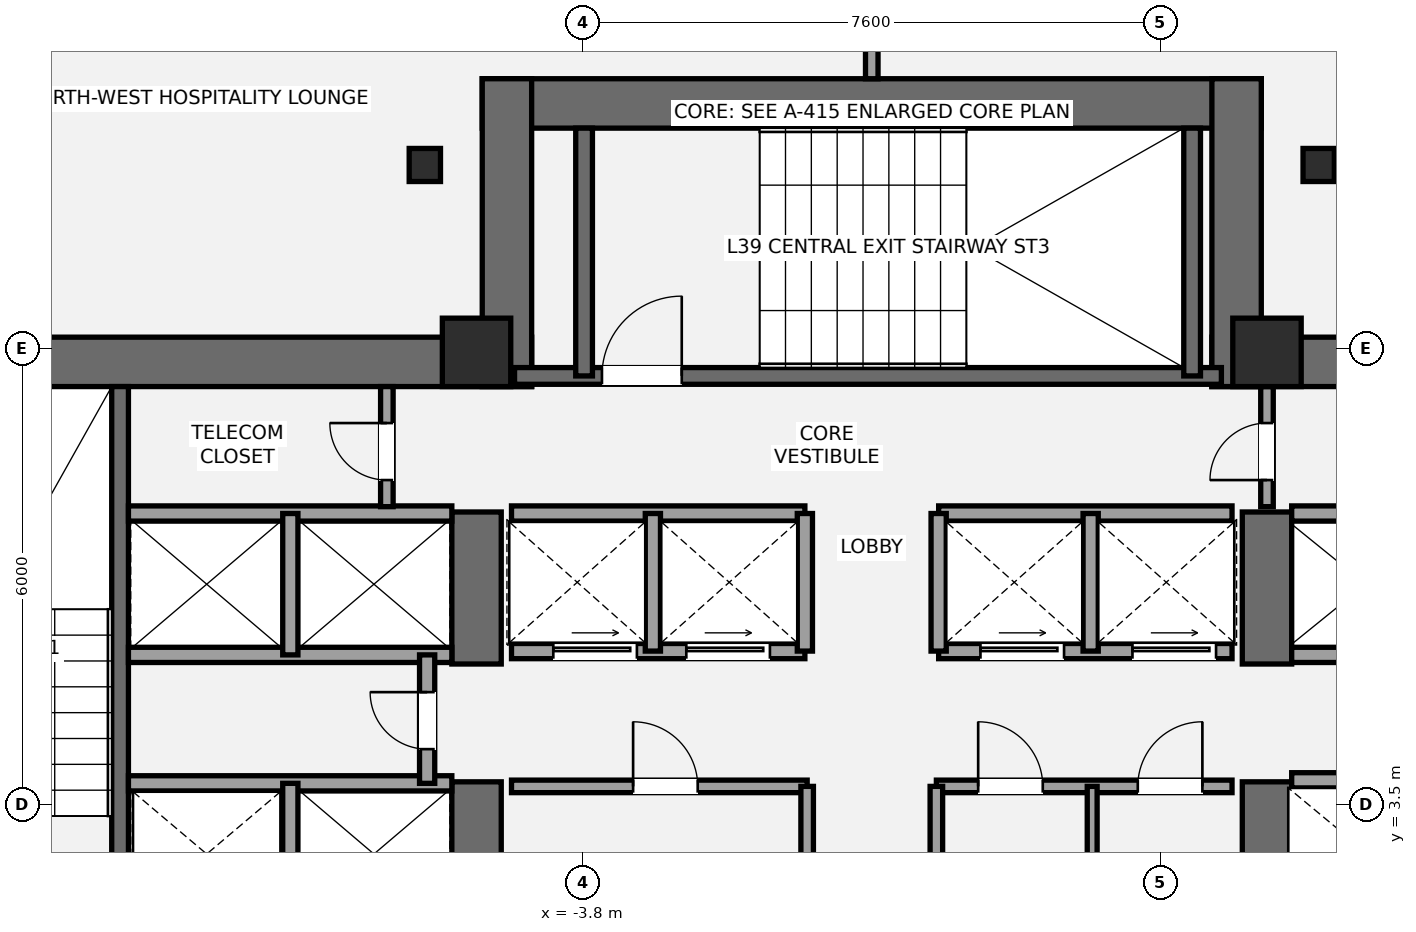
"""IFC4 building model, lengths in metres.
Left out: names, types, materials, properties, quantities, classifications, styles, units other than length and angle.
Written with IfcOpenShell. Run it as: python <this file> out.ifc"""

import sys

from ifc_helpers import new_model, si_unit, direction, frame, frame_2d, origin, origin_2d, place, context, subcontext, project, spatial, rectangle, i_section, extrude, element, fill, save


model = new_model("IFC4")
c1 = context("Model", 3, precision=1e-05, world=origin(), true_north=direction((0.0, 1.0)))
c2 = subcontext(c1, "Body", "Model", "MODEL_VIEW")
j1 = project(units=[si_unit("LENGTHUNIT", "METRE"), si_unit("PLANEANGLEUNIT", "RADIAN")], contexts=[c1])
p1 = place(None, origin())
s1 = spatial("IfcSite", under=j1, at=p1, CompositionType="ELEMENT")
p2 = place(p1, origin())
s2 = spatial("IfcBuilding", under=s1, at=p2, CompositionType="ELEMENT")
p3 = place(p2, frame((0.0, 0.0, 147.0)))
s3 = spatial("IfcBuildingStorey", under=s2, at=p3, CompositionType="ELEMENT", Elevation=147.0)
p4 = place(p3, frame((-13.8, 9.325, 0.0), z_axis=(0.0, 0.0, 1.0), x_axis=(1.0, 0.0, 0.0)))
e1 = element("IfcWall", 1, at=p4, inside=s3, PredefinedType="SHEAR", context=c2, shape_type="SweptSolid", body=[
    extrude(rectangle(XDim=9.325, YDim=0.65, at=frame_2d((4.663, 0.0))), origin(), (0.0, 0.0, 1.0), 3.2),
])
p5 = place(p3, frame((-5.2, 1.2, 0.0), z_axis=(0.0, 0.0, 1.0), x_axis=(0.0, 1.0, 0.0)))
e2 = element("IfcWall", 2, at=p5, inside=s3, PredefinedType="SHEAR", context=c2, shape_type="SweptSolid", body=[
    extrude(rectangle(XDim=2.6, YDim=0.65, at=frame_2d((1.3, 0.0))), origin(), (0.0, 0.0, 1.0), 3.2),
])
p6 = place(p3, frame((-5.2, 5.35, 0.0), z_axis=(0.0, 0.0, 1.0), x_axis=(0.0, 1.0, 0.0)))
e3 = element("IfcWall", 3, at=p6, inside=s3, PredefinedType="SHEAR", context=c2, shape_type="SweptSolid", body=[
    extrude(rectangle(XDim=2.0, YDim=0.65, at=frame_2d((1.0, 0.0))), origin(), (0.0, 0.0, 1.0), 3.2),
])
p7 = place(p3, frame((-9.89, 1.85, 0.0), z_axis=(0.0, 0.0, 1.0), x_axis=(0.0, 1.0, 0.0)))
e4 = element("IfcWall", 4, at=p7, inside=s3, PredefinedType="SHEAR", context=c2, shape_type="SweptSolid", body=[
    extrude(rectangle(XDim=7.15, YDim=0.22, at=frame_2d((3.575, 0.0))), origin(), (0.0, 0.0, 1.0), 3.2),
])
p8 = place(p3, frame((4.475, 9.325, 0.0), z_axis=(0.0, 0.0, 1.0), x_axis=(1.0, 0.0, 0.0)))
e5 = element("IfcWall", 5, at=p8, inside=s3, PredefinedType="SHEAR", context=c2, shape_type="SweptSolid", body=[
    extrude(rectangle(XDim=9.325, YDim=0.65, at=frame_2d((4.663, 0.0))), origin(), (0.0, 0.0, 1.0), 3.2),
])
p9 = place(p3, frame((5.2, 1.2, 0.0), z_axis=(0.0, 0.0, 1.0), x_axis=(0.0, 1.0, 0.0)))
e6 = element("IfcWall", 6, at=p9, inside=s3, PredefinedType="SHEAR", context=c2, shape_type="SweptSolid", body=[
    extrude(rectangle(XDim=2.6, YDim=0.65, at=frame_2d((1.3, 0.0))), origin(), (0.0, 0.0, 1.0), 3.2),
])
p10 = place(p3, frame((5.2, 5.35, 0.0), z_axis=(0.0, 0.0, 1.0), x_axis=(0.0, 1.0, 0.0)))
e7 = element("IfcWall", 7, at=p10, inside=s3, PredefinedType="SHEAR", context=c2, shape_type="SweptSolid", body=[
    extrude(rectangle(XDim=2.0, YDim=0.65, at=frame_2d((1.0, 0.0))), origin(), (0.0, 0.0, 1.0), 3.2),
])
p11 = place(p3, frame((-5.125, 12.725, 0.0), z_axis=(0.0, 0.0, 1.0), x_axis=(1.0, 0.0, 0.0)))
e8 = element("IfcWall", 8, at=p11, inside=s3, PredefinedType="SHEAR", context=c2, shape_type="SweptSolid", body=[
    extrude(rectangle(XDim=10.25, YDim=0.65, at=frame_2d((5.125, 0.0))), origin(), (0.0, 0.0, 1.0), 3.2),
])
for number, where, z_axis, x_axis in (
    (9, (-4.8, 9.0, 0.0), (0.0, 0.0, 1.0), (0.0, 1.0, 0.0)),
    (10, (4.8, 9.0, 0.0), (0.0, 0.0, 1.0), (0.0, 1.0, 0.0)),
):
    element("IfcWall", number, at=place(p3, frame(where, z_axis=z_axis, x_axis=x_axis)), inside=s3, PredefinedType="SHEAR", context=c2, shape_type="SweptSolid", body=[
        extrude(rectangle(XDim=4.05, YDim=0.65, at=frame_2d((2.025, 0.0))), origin(), (0.0, 0.0, 1.0), 3.2),
    ])
p12 = place(p3, frame((-4.7, 9.14, 0.0), z_axis=(0.0, 0.0, 1.0), x_axis=(1.0, 0.0, 0.0)))
e11 = element("IfcWall", 11, at=p12, inside=s3, PredefinedType="SHEAR", context=c2, shape_type="SweptSolid", body=[
    extrude(rectangle(XDim=9.3, YDim=0.22, at=frame_2d((4.65, 0.0))), origin(), (0.0, 0.0, 1.0), 3.2),
])
p13 = place(p12, frame((1.15, 0.0, 0.0)))
e12 = element("IfcOpeningElement", 12, at=p13, cuts=e11, PredefinedType="OPENING", context=c2, shape_type="SweptSolid", body=[
    extrude(rectangle(XDim=1.05, YDim=2.15, at=frame_2d((0.525, 1.075))), frame((0.0, 0.12, 0.0), z_axis=(0.0, -1.0, 0.0), x_axis=(1.0, 0.0, 0.0)), (0.0, 0.0, 1.0), 0.24),
])
for number, where, z_axis, x_axis in (
    (13, (-3.785, 9.14, 0.0), (0.0, 0.0, 1.0), (0.0, 1.0, 0.0)),
    (14, (4.215, 9.14, 0.0), (0.0, 0.0, 1.0), (0.0, 1.0, 0.0)),
):
    element("IfcWall", number, at=place(p3, frame(where, z_axis=z_axis, x_axis=x_axis)), inside=s3, PredefinedType="SHEAR", context=c2, shape_type="SweptSolid", body=[
        extrude(rectangle(XDim=3.26, YDim=0.22, at=frame_2d((1.63, 0.0))), origin(), (0.0, 0.0, 1.0), 3.2),
    ])
for number, where, z_axis, x_axis in (
    (15, (-5.2, 9.45, 0.0), (0.0, 0.0, 1.0), (1.0, 0.0, 0.0)),
    (16, (5.2, 9.45, 0.0), (0.0, 0.0, 1.0), (1.0, 0.0, 0.0)),
):
    element("IfcColumn", number, at=place(p3, frame(where, z_axis=z_axis, x_axis=x_axis)), inside=s3, PredefinedType="COLUMN", context=c2, shape_type="SweptSolid", body=[
        extrude(rectangle(XDim=0.9, YDim=0.9, at=origin_2d()), origin(), (0.0, 0.0, 1.0), 3.2),
    ])
for number, where, z_axis, x_axis in (
    (17, (5.88, 11.915, 0.0), (0.0, 0.0, 1.0), (1.0, 0.0, 0.0)),
    (18, (-5.88, 11.915, 0.0), (0.0, 0.0, 1.0), (1.0, 0.0, 0.0)),
):
    element("IfcColumn", number, at=place(p3, frame(where, z_axis=z_axis, x_axis=x_axis)), inside=s3, PredefinedType="COLUMN", context=c2, shape_type="SweptSolid", body=[
        extrude(i_section(OverallWidth=0.412, OverallDepth=0.435, WebThickness=0.036, FlangeThickness=0.057, at=origin_2d()), origin(), (0.0, 0.0, 1.0), 3.2),
    ])
p14 = place(p3, frame((-9.78, 3.78, 0.0), z_axis=(0.0, 0.0, 1.0), x_axis=(1.0, 0.0, 0.0)))
e19 = element("IfcWall", 19, at=p14, inside=s3, PredefinedType="SOLIDWALL", context=c2, shape_type="SweptSolid", body=[
    extrude(rectangle(XDim=4.255, YDim=0.2, at=frame_2d((2.127, 0.0))), origin(), (0.0, 0.0, 1.0), 3.02),
])
p15 = place(p3, frame((-7.65, 1.85, 0.0), z_axis=(0.0, 0.0, 1.0), x_axis=(0.0, 1.0, 0.0)))
e20 = element("IfcWall", 20, at=p15, inside=s3, PredefinedType="SOLIDWALL", context=c2, shape_type="SweptSolid", body=[
    extrude(rectangle(XDim=1.93, YDim=0.2, at=frame_2d((0.965, 0.0))), origin(), (0.0, 0.0, 1.0), 3.02),
])
for number, where, z_axis, x_axis in (
    (21, (-9.78, 5.47, 0.0), (0.0, 0.0, 1.0), (1.0, 0.0, 0.0)),
    (22, (-9.78, 7.33, 0.0), (0.0, 0.0, 1.0), (1.0, 0.0, 0.0)),
):
    element("IfcWall", number, at=place(p3, frame(where, z_axis=z_axis, x_axis=x_axis)), inside=s3, PredefinedType="SOLIDWALL", context=c2, shape_type="SweptSolid", body=[
        extrude(rectangle(XDim=4.255, YDim=0.2, at=frame_2d((2.127, 0.0))), origin(), (0.0, 0.0, 1.0), 3.02),
    ])
p16 = place(p3, frame((-7.65, 5.47, 0.0), z_axis=(0.0, 0.0, 1.0), x_axis=(0.0, 1.0, 0.0)))
e23 = element("IfcWall", 23, at=p16, inside=s3, PredefinedType="SOLIDWALL", context=c2, shape_type="SweptSolid", body=[
    extrude(rectangle(XDim=1.86, YDim=0.2, at=frame_2d((0.93, 0.0))), origin(), (0.0, 0.0, 1.0), 3.02),
])
p17 = place(p3, frame((-5.85, 3.78, 0.0), z_axis=(0.0, 0.0, 1.0), x_axis=(0.0, 1.0, 0.0)))
e24 = element("IfcWall", 24, at=p17, inside=s3, PredefinedType="SOLIDWALL", context=c2, shape_type="SweptSolid", body=[
    extrude(rectangle(XDim=1.69, YDim=0.2, at=frame_2d((0.845, 0.0))), origin(), (0.0, 0.0, 1.0), 3.02),
])
p18 = place(p17, frame((0.45, 0.0, 0.0)))
e25 = element("IfcOpeningElement", 25, at=p18, cuts=e24, PredefinedType="OPENING", context=c2, shape_type="SweptSolid", body=[
    extrude(rectangle(XDim=0.75, YDim=2.1, at=frame_2d((0.375, 1.05))), frame((0.0, 0.11, 0.0), z_axis=(0.0, -1.0, 0.0), x_axis=(1.0, 0.0, 0.0)), (0.0, 0.0, 1.0), 0.22),
])
p19 = place(p3, frame((5.525, 3.82, 0.0), z_axis=(0.0, 0.0, 1.0), x_axis=(1.0, 0.0, 0.0)))
e26 = element("IfcWall", 26, at=p19, inside=s3, PredefinedType="SOLIDWALL", context=c2, shape_type="SweptSolid", body=[
    extrude(rectangle(XDim=4.255, YDim=0.2, at=frame_2d((2.127, 0.0))), origin(), (0.0, 0.0, 1.0), 3.02),
])
p20 = place(p19, frame((0.65, 0.0, 0.0)))
e27 = element("IfcOpeningElement", 27, at=p20, cuts=e26, PredefinedType="OPENING", context=c2, shape_type="SweptSolid", body=[
    extrude(rectangle(XDim=1.2, YDim=2.2, at=frame_2d((0.6, 1.1))), frame((0.0, 0.11, 0.0), z_axis=(0.0, -1.0, 0.0), x_axis=(1.0, 0.0, 0.0)), (0.0, 0.0, 1.0), 0.22),
])
for number, where, z_axis, x_axis in (
    (28, (5.525, 5.47, 0.0), (0.0, 0.0, 1.0), (1.0, 0.0, 0.0)),
    (29, (5.525, 7.33, 0.0), (0.0, 0.0, 1.0), (1.0, 0.0, 0.0)),
):
    element("IfcWall", number, at=place(p3, frame(where, z_axis=z_axis, x_axis=x_axis)), inside=s3, PredefinedType="SOLIDWALL", context=c2, shape_type="SweptSolid", body=[
        extrude(rectangle(XDim=4.255, YDim=0.2, at=frame_2d((2.127, 0.0))), origin(), (0.0, 0.0, 1.0), 3.02),
    ])
p21 = place(p3, frame((-4.74, 3.74, 0.0), z_axis=(0.0, 0.0, 1.0), x_axis=(1.0, 0.0, 0.0)))
e30 = element("IfcWall", 30, at=p21, inside=s3, PredefinedType="PARTITIONING", context=c2, shape_type="SweptSolid", body=[
    extrude(rectangle(XDim=3.89, YDim=0.165, at=frame_2d((1.945, 0.0))), origin(), (0.0, 0.0, 1.0), 3.02),
])
p22 = place(p21, frame((1.6, 0.0, 0.0)))
e31 = element("IfcOpeningElement", 31, at=p22, cuts=e30, PredefinedType="OPENING", context=c2, shape_type="SweptSolid", body=[
    extrude(rectangle(XDim=0.85, YDim=2.1, at=frame_2d((0.425, 1.05))), frame((0.0, 0.093, 0.0), z_axis=(0.0, -1.0, 0.0), x_axis=(1.0, 0.0, 0.0)), (0.0, 0.0, 1.0), 0.185),
])
p23 = place(p3, frame((-0.85, 1.92, 0.0), z_axis=(0.0, 0.0, 1.0), x_axis=(0.0, 1.0, 0.0)))
e32 = element("IfcWall", 32, at=p23, inside=s3, PredefinedType="PARTITIONING", context=c2, shape_type="SweptSolid", body=[
    extrude(rectangle(XDim=1.82, YDim=0.165, at=frame_2d((0.91, 0.0))), origin(), (0.0, 0.0, 1.0), 3.02),
])
p24 = place(p3, frame((0.85, 3.74, 0.0), z_axis=(0.0, 0.0, 1.0), x_axis=(1.0, 0.0, 0.0)))
e33 = element("IfcWall", 33, at=p24, inside=s3, PredefinedType="PARTITIONING", context=c2, shape_type="SweptSolid", body=[
    extrude(rectangle(XDim=3.89, YDim=0.165, at=frame_2d((1.945, 0.0))), origin(), (0.0, 0.0, 1.0), 3.02),
])
p25 = place(p24, frame((0.55, 0.0, 0.0)))
e34 = element("IfcOpeningElement", 34, at=p25, cuts=e33, PredefinedType="OPENING", context=c2, shape_type="SweptSolid", body=[
    extrude(rectangle(XDim=0.85, YDim=2.1, at=frame_2d((0.425, 1.05))), frame((0.0, 0.093, 0.0), z_axis=(0.0, -1.0, 0.0), x_axis=(1.0, 0.0, 0.0)), (0.0, 0.0, 1.0), 0.185),
])
p26 = place(p24, frame((2.65, 0.0, 0.0)))
e35 = element("IfcOpeningElement", 35, at=p26, cuts=e33, PredefinedType="OPENING", context=c2, shape_type="SweptSolid", body=[
    extrude(rectangle(XDim=0.85, YDim=2.1, at=frame_2d((0.425, 1.05))), frame((0.0, 0.093, 0.0), z_axis=(0.0, -1.0, 0.0), x_axis=(1.0, 0.0, 0.0)), (0.0, 0.0, 1.0), 0.185),
])
p27 = place(p3, frame((0.85, 1.92, 0.0), z_axis=(0.0, 0.0, 1.0), x_axis=(0.0, 1.0, 0.0)))
e36 = element("IfcWall", 36, at=p27, inside=s3, PredefinedType="PARTITIONING", context=c2, shape_type="SweptSolid", body=[
    extrude(rectangle(XDim=1.82, YDim=0.165, at=frame_2d((0.91, 0.0))), origin(), (0.0, 0.0, 1.0), 3.02),
])
p28 = place(p3, frame((2.9, 1.92, 0.0), z_axis=(0.0, 0.0, 1.0), x_axis=(0.0, 1.0, 0.0)))
e37 = element("IfcWall", 37, at=p28, inside=s3, PredefinedType="PARTITIONING", context=c2, shape_type="SweptSolid", body=[
    extrude(rectangle(XDim=1.82, YDim=0.13, at=frame_2d((0.91, 0.0))), origin(), (0.0, 0.0, 1.0), 3.02),
])
p29 = place(p3, frame((-4.74, 5.52, 0.0), z_axis=(0.0, 0.0, 1.0), x_axis=(1.0, 0.0, 0.0)))
e38 = element("IfcWall", 38, at=p29, inside=s3, PredefinedType="SOLIDWALL", context=c2, shape_type="SweptSolid", body=[
    extrude(rectangle(XDim=3.86, YDim=0.2, at=frame_2d((1.93, 0.0))), origin(), (0.0, 0.0, 1.0), 3.02),
])
p30 = place(p29, frame((0.55, 0.0, 0.0)))
e39 = element("IfcOpeningElement", 39, at=p30, cuts=e38, PredefinedType="OPENING", context=c2, shape_type="SweptSolid", body=[
    extrude(rectangle(XDim=1.1, YDim=2.2, at=frame_2d((0.55, 1.1))), frame((0.0, 0.11, 0.0), z_axis=(0.0, -1.0, 0.0), x_axis=(1.0, 0.0, 0.0)), (0.0, 0.0, 1.0), 0.22),
])
p31 = place(p29, frame((2.3, 0.0, 0.0)))
e40 = element("IfcOpeningElement", 40, at=p31, cuts=e38, PredefinedType="OPENING", context=c2, shape_type="SweptSolid", body=[
    extrude(rectangle(XDim=1.1, YDim=2.2, at=frame_2d((0.55, 1.1))), frame((0.0, 0.11, 0.0), z_axis=(0.0, -1.0, 0.0), x_axis=(1.0, 0.0, 0.0)), (0.0, 0.0, 1.0), 0.22),
])
p32 = place(p3, frame((0.88, 5.52, 0.0), z_axis=(0.0, 0.0, 1.0), x_axis=(1.0, 0.0, 0.0)))
e41 = element("IfcWall", 41, at=p32, inside=s3, PredefinedType="SOLIDWALL", context=c2, shape_type="SweptSolid", body=[
    extrude(rectangle(XDim=3.86, YDim=0.2, at=frame_2d((1.93, 0.0))), origin(), (0.0, 0.0, 1.0), 3.02),
])
p33 = place(p32, frame((0.55, 0.0, 0.0)))
e42 = element("IfcOpeningElement", 42, at=p33, cuts=e41, PredefinedType="OPENING", context=c2, shape_type="SweptSolid", body=[
    extrude(rectangle(XDim=1.1, YDim=2.2, at=frame_2d((0.55, 1.1))), frame((0.0, 0.11, 0.0), z_axis=(0.0, -1.0, 0.0), x_axis=(1.0, 0.0, 0.0)), (0.0, 0.0, 1.0), 0.22),
])
p34 = place(p32, frame((2.55, 0.0, 0.0)))
e43 = element("IfcOpeningElement", 43, at=p34, cuts=e41, PredefinedType="OPENING", context=c2, shape_type="SweptSolid", body=[
    extrude(rectangle(XDim=1.1, YDim=2.2, at=frame_2d((0.55, 1.1))), frame((0.0, 0.11, 0.0), z_axis=(0.0, -1.0, 0.0), x_axis=(1.0, 0.0, 0.0)), (0.0, 0.0, 1.0), 0.22),
])
for number, where, z_axis, x_axis in (
    (44, (-4.74, 7.33, 0.0), (0.0, 0.0, 1.0), (1.0, 0.0, 0.0)),
    (45, (0.88, 7.33, 0.0), (0.0, 0.0, 1.0), (1.0, 0.0, 0.0)),
):
    element("IfcWall", number, at=place(p3, frame(where, z_axis=z_axis, x_axis=x_axis)), inside=s3, PredefinedType="SOLIDWALL", context=c2, shape_type="SweptSolid", body=[
        extrude(rectangle(XDim=3.86, YDim=0.2, at=frame_2d((1.93, 0.0))), origin(), (0.0, 0.0, 1.0), 3.02),
    ])
for number, where, z_axis, x_axis in (
    (46, (-2.88, 5.52, 0.0), (0.0, 0.0, 1.0), (0.0, 1.0, 0.0)),
    (47, (2.88, 5.52, 0.0), (0.0, 0.0, 1.0), (0.0, 1.0, 0.0)),
    (48, (-0.88, 5.52, 0.0), (0.0, 0.0, 1.0), (0.0, 1.0, 0.0)),
    (49, (0.88, 5.52, 0.0), (0.0, 0.0, 1.0), (0.0, 1.0, 0.0)),
):
    element("IfcWall", number, at=place(p3, frame(where, z_axis=z_axis, x_axis=x_axis)), inside=s3, PredefinedType="SOLIDWALL", context=c2, shape_type="SweptSolid", body=[
        extrude(rectangle(XDim=1.81, YDim=0.2, at=frame_2d((0.905, 0.0))), origin(), (0.0, 0.0, 1.0), 3.02),
    ])
p35 = place(p3, frame((-6.38, 7.42, 0.0), z_axis=(0.0, 0.0, 1.0), x_axis=(0.0, 1.0, 0.0)))
e50 = element("IfcWall", 50, at=p35, inside=s3, PredefinedType="PARTITIONING", context=c2, shape_type="SweptSolid", body=[
    extrude(rectangle(XDim=1.58, YDim=0.165, at=frame_2d((0.79, 0.0))), origin(), (0.0, 0.0, 1.0), 3.02),
])
p36 = place(p35, frame((0.35, 0.0, 0.0)))
e51 = element("IfcOpeningElement", 51, at=p36, cuts=e50, PredefinedType="OPENING", context=c2, shape_type="SweptSolid", body=[
    extrude(rectangle(XDim=0.75, YDim=2.1, at=frame_2d((0.375, 1.05))), frame((0.0, 0.093, 0.0), z_axis=(0.0, -1.0, 0.0), x_axis=(1.0, 0.0, 0.0)), (0.0, 0.0, 1.0), 0.185),
])
p37 = place(p3, frame((5.2, 7.42, 0.0), z_axis=(0.0, 0.0, 1.0), x_axis=(0.0, 1.0, 0.0)))
e52 = element("IfcWall", 52, at=p37, inside=s3, PredefinedType="PARTITIONING", context=c2, shape_type="SweptSolid", body=[
    extrude(rectangle(XDim=1.58, YDim=0.165, at=frame_2d((0.79, 0.0))), origin(), (0.0, 0.0, 1.0), 3.02),
])
p38 = place(p37, frame((0.35, 0.0, 0.0)))
e53 = element("IfcOpeningElement", 53, at=p38, cuts=e52, PredefinedType="OPENING", context=c2, shape_type="SweptSolid", body=[
    extrude(rectangle(XDim=0.75, YDim=2.1, at=frame_2d((0.375, 1.05))), frame((0.0, 0.093, 0.0), z_axis=(0.0, -1.0, 0.0), x_axis=(1.0, 0.0, 0.0)), (0.0, 0.0, 1.0), 0.185),
])
p39 = place(p3, frame((0.0, 13.05, 0.0), z_axis=(0.0, 0.0, 1.0), x_axis=(0.0, 1.0, 0.0)))
e54 = element("IfcWall", 54, at=p39, inside=s3, PredefinedType="PARTITIONING", context=c2, shape_type="SweptSolid", body=[
    extrude(rectangle(XDim=3.213, YDim=0.165, at=frame_2d((1.606, 0.0))), origin(), (0.0, 0.0, 1.0), 3.02),
])
p40 = place(p13, origin())
e55 = element("IfcDoor", 55, at=p40, inside=s3, OperationType="SINGLE_SWING_RIGHT", PredefinedType="DOOR", context=c2, shape_type="SweptSolid", body=[
    extrude(rectangle(XDim=1.05, YDim=2.15, at=frame_2d((0.525, 1.075))), frame((0.0, 0.025, 0.0), z_axis=(0.0, -1.0, 0.0), x_axis=(1.0, 0.0, 0.0)), (0.0, 0.0, 1.0), 0.05),
])
fill(e12, e55)
p41 = place(p18, origin())
e56 = element("IfcDoor", 56, at=p41, inside=s3, OperationType="SINGLE_SWING_RIGHT", PredefinedType="DOOR", context=c2, shape_type="SweptSolid", body=[
    extrude(rectangle(XDim=0.75, YDim=2.1, at=frame_2d((0.375, 1.05))), frame((0.0, 0.025, 0.0), z_axis=(0.0, -1.0, 0.0), x_axis=(1.0, 0.0, 0.0)), (0.0, 0.0, 1.0), 0.05),
])
fill(e25, e56)
p42 = place(p22, origin())
e57 = element("IfcDoor", 57, at=p42, inside=s3, OperationType="SINGLE_SWING_LEFT", PredefinedType="DOOR", context=c2, shape_type="SweptSolid", body=[
    extrude(rectangle(XDim=0.85, YDim=2.1, at=frame_2d((0.425, 1.05))), frame((0.0, 0.025, 0.0), z_axis=(0.0, -1.0, 0.0), x_axis=(1.0, 0.0, 0.0)), (0.0, 0.0, 1.0), 0.05),
])
fill(e31, e57)
p43 = place(p25, origin())
e58 = element("IfcDoor", 58, at=p43, inside=s3, OperationType="SINGLE_SWING_LEFT", PredefinedType="DOOR", context=c2, shape_type="SweptSolid", body=[
    extrude(rectangle(XDim=0.85, YDim=2.1, at=frame_2d((0.425, 1.05))), frame((0.0, 0.025, 0.0), z_axis=(0.0, -1.0, 0.0), x_axis=(1.0, 0.0, 0.0)), (0.0, 0.0, 1.0), 0.05),
])
fill(e34, e58)
p44 = place(p26, origin())
e59 = element("IfcDoor", 59, at=p44, inside=s3, OperationType="SINGLE_SWING_RIGHT", PredefinedType="DOOR", context=c2, shape_type="SweptSolid", body=[
    extrude(rectangle(XDim=0.85, YDim=2.1, at=frame_2d((0.425, 1.05))), frame((0.0, 0.025, 0.0), z_axis=(0.0, -1.0, 0.0), x_axis=(1.0, 0.0, 0.0)), (0.0, 0.0, 1.0), 0.05),
])
fill(e35, e59)
p45 = place(p30, origin())
e60 = element("IfcDoor", 60, at=p45, inside=s3, OperationType="SLIDING_TO_LEFT", PredefinedType="DOOR", context=c2, shape_type="SweptSolid", body=[
    extrude(rectangle(XDim=1.1, YDim=2.2, at=frame_2d((0.55, 1.1))), frame((0.0, 0.025, 0.0), z_axis=(0.0, -1.0, 0.0), x_axis=(1.0, 0.0, 0.0)), (0.0, 0.0, 1.0), 0.05),
])
fill(e39, e60)
p46 = place(p31, origin())
e61 = element("IfcDoor", 61, at=p46, inside=s3, OperationType="SLIDING_TO_LEFT", PredefinedType="DOOR", context=c2, shape_type="SweptSolid", body=[
    extrude(rectangle(XDim=1.1, YDim=2.2, at=frame_2d((0.55, 1.1))), frame((0.0, 0.025, 0.0), z_axis=(0.0, -1.0, 0.0), x_axis=(1.0, 0.0, 0.0)), (0.0, 0.0, 1.0), 0.05),
])
fill(e40, e61)
p47 = place(p33, origin())
e62 = element("IfcDoor", 62, at=p47, inside=s3, OperationType="SLIDING_TO_LEFT", PredefinedType="DOOR", context=c2, shape_type="SweptSolid", body=[
    extrude(rectangle(XDim=1.1, YDim=2.2, at=frame_2d((0.55, 1.1))), frame((0.0, 0.025, 0.0), z_axis=(0.0, -1.0, 0.0), x_axis=(1.0, 0.0, 0.0)), (0.0, 0.0, 1.0), 0.05),
])
fill(e42, e62)
p48 = place(p34, origin())
e63 = element("IfcDoor", 63, at=p48, inside=s3, OperationType="SLIDING_TO_LEFT", PredefinedType="DOOR", context=c2, shape_type="SweptSolid", body=[
    extrude(rectangle(XDim=1.1, YDim=2.2, at=frame_2d((0.55, 1.1))), frame((0.0, 0.025, 0.0), z_axis=(0.0, -1.0, 0.0), x_axis=(1.0, 0.0, 0.0)), (0.0, 0.0, 1.0), 0.05),
])
fill(e43, e63)
p49 = place(p36, origin())
e64 = element("IfcDoor", 64, at=p49, inside=s3, OperationType="SINGLE_SWING_RIGHT", PredefinedType="DOOR", context=c2, shape_type="SweptSolid", body=[
    extrude(rectangle(XDim=0.75, YDim=2.1, at=frame_2d((0.375, 1.05))), frame((0.0, 0.025, 0.0), z_axis=(0.0, -1.0, 0.0), x_axis=(1.0, 0.0, 0.0)), (0.0, 0.0, 1.0), 0.05),
])
fill(e51, e64)
p50 = place(p38, origin())
e65 = element("IfcDoor", 65, at=p50, inside=s3, OperationType="SINGLE_SWING_LEFT", PredefinedType="DOOR", context=c2, shape_type="SweptSolid", body=[
    extrude(rectangle(XDim=0.75, YDim=2.1, at=frame_2d((0.375, 1.05))), frame((0.0, 0.025, 0.0), z_axis=(0.0, -1.0, 0.0), x_axis=(1.0, 0.0, 0.0)), (0.0, 0.0, 1.0), 0.05),
])
fill(e53, e65)
save(model, sys.argv[1])
